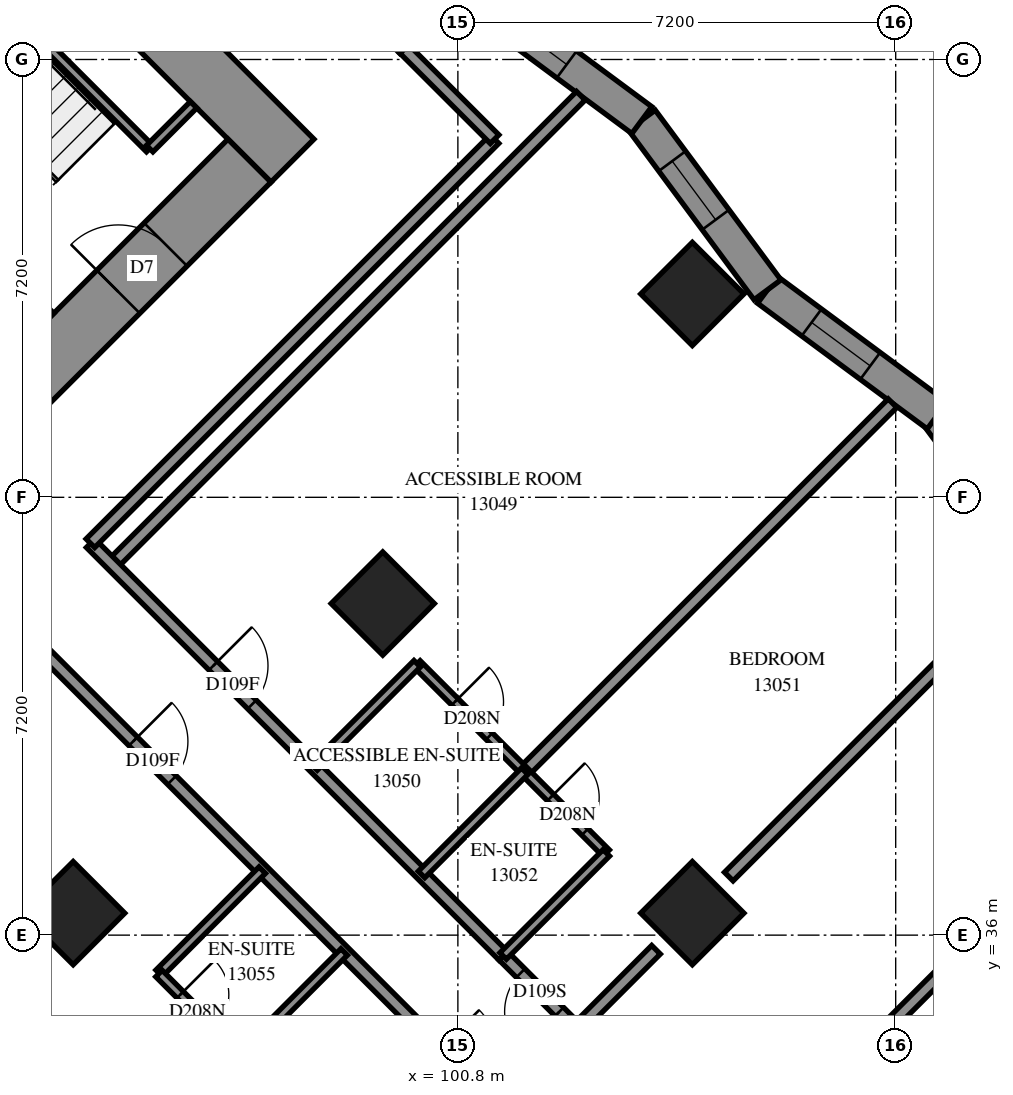
"""IFC4 building model, lengths in metres.
Left out: names, types, materials, properties, quantities, classifications, styles, units other than length and angle.
Written with IfcOpenShell. Run it as: python <this file> out.ifc"""

import sys

from ifc_helpers import new_model, si_unit, direction, frame, frame_2d, origin, origin_2d, place, context, subcontext, project, spatial, polyline, rectangle, outline, extrude, element, fill, save


model = new_model("IFC4")
c1 = context("Model", 3, precision=1e-05, world=origin(), true_north=direction((0.0, 1.0)))
c2 = subcontext(c1, "Body", "Model", "MODEL_VIEW")
j1 = project(units=[si_unit("LENGTHUNIT", "METRE"), si_unit("PLANEANGLEUNIT", "RADIAN")], contexts=[c1])
p1 = place(None, origin())
s1 = spatial("IfcSite", under=j1, at=p1, CompositionType="ELEMENT")
p2 = place(p1, origin())
s2 = spatial("IfcBuilding", under=s1, at=p2, CompositionType="ELEMENT")
p3 = place(p2, frame((0.0, 0.0, 50.8)))
s3 = spatial("IfcBuildingStorey", under=s2, at=p3, CompositionType="ELEMENT", Elevation=50.8)
for number, where, z_axis, x_axis in (
    (1, (104.656, 46.544, 0.0), (0.0, 0.0, 1.0), (0.707, -0.707, 0.0)),
    (2, (99.565, 41.453, 0.0), (0.0, 0.0, 1.0), (0.707, -0.707, 0.0)),
    (3, (94.474, 36.362, 0.0), (0.0, 0.0, 1.0), (0.707, -0.707, 0.0)),
    (4, (104.656, 36.362, 0.0), (0.0, 0.0, 1.0), (0.707, -0.707, 0.0)),
):
    element("IfcColumn", number, at=place(p3, frame(where, z_axis=z_axis, x_axis=x_axis)), inside=s3, PredefinedType="COLUMN", context=c2, shape_type="SweptSolid", body=[
        extrude(rectangle(XDim=1.2, YDim=1.2, at=origin_2d()), origin(), (0.0, 0.0, 1.0), 3.1),
    ])
p4 = place(p3, frame((86.483, 60.333, -0.3), z_axis=(0.0, 0.0, 1.0), x_axis=(0.70710983, -0.7071037324, 0.0)))
e5 = element("IfcWall", 5, at=p4, inside=s3, PredefinedType="SHEAR", context=c2, shape_type="SweptSolid", body=[
    extrude(rectangle(XDim=16.4, YDim=1.0, at=frame_2d((8.2, 0.0))), origin(), (0.0, 0.0, 1.0), 2.7),
])
p5 = place(p4, frame((11.0, 0.0, 0.3)))
e6 = element("IfcOpeningElement", 6, at=p5, cuts=e5, PredefinedType="OPENING", context=c2, shape_type="SweptSolid", body=[
    extrude(rectangle(XDim=0.8, YDim=2.1, at=frame_2d((0.4, 1.05))), frame((0.0, 0.51, 0.0), z_axis=(0.0, -1.0, 0.0), x_axis=(1.0, 0.0, 0.0)), (0.0, 0.0, 1.0), 1.02),
])
p6 = place(p3, frame((87.19, 38.554, -0.3), z_axis=(0.0, 0.0, 1.0), x_axis=(0.707103309, 0.7071102534, 0.0)))
e7 = element("IfcWall", 7, at=p6, inside=s3, PredefinedType="SHEAR", context=c2, shape_type="SweptSolid", body=[
    extrude(rectangle(XDim=14.4, YDim=1.0, at=frame_2d((7.2, 0.0))), origin(), (0.0, 0.0, 1.0), 2.7),
])
p7 = place(p6, frame((4.55, 0.0, 0.3)))
e8 = element("IfcOpeningElement", 8, at=p7, cuts=e7, PredefinedType="OPENING", context=c2, shape_type="SweptSolid", body=[
    extrude(rectangle(XDim=1.1, YDim=2.1, at=frame_2d((0.55, 1.05))), frame((0.0, 0.51, 0.0), z_axis=(0.0, -1.0, 0.0), x_axis=(1.0, 0.0, 0.0)), (0.0, 0.0, 1.0), 1.02),
])
p8 = place(p6, frame((11.35, 0.0, 0.3)))
e9 = element("IfcOpeningElement", 9, at=p8, cuts=e7, PredefinedType="OPENING", context=c2, shape_type="SweptSolid", body=[
    extrude(rectangle(XDim=1.1, YDim=2.1, at=frame_2d((0.55, 1.05))), frame((0.0, 0.51, 0.0), z_axis=(0.0, -1.0, 0.0), x_axis=(1.0, 0.0, 0.0)), (0.0, 0.0, 1.0), 1.02),
])
p9 = place(p3, frame((88.958, 51.211, 0.0), z_axis=(0.0, 0.0, 1.0), x_axis=(0.7070998367, -0.7071137256, 0.0)))
e10 = element("IfcWall", 10, at=p9, inside=s3, PredefinedType="SOLIDWALL", context=c2, shape_type="SweptSolid", body=[
    extrude(rectangle(XDim=7.2, YDim=0.3, at=frame_2d((3.6, 0.0))), origin(), (0.0, 0.0, 1.0), 3.1),
])
p10 = place(p3, frame((110.749, 41.755, 0.0), z_axis=(0.0, 0.0, 1.0), x_axis=(-0.5951283843, 0.8036306404, 0.0)))
e11 = element("IfcWall", 11, at=p10, inside=s3, PredefinedType="SOLIDWALL", context=c2, shape_type="SweptSolid", body=[
    extrude(outline(polyline([(0.041, -0.275), (3.514, -0.275), (3.432, 0.275), (-0.041, 0.275), (0.041, -0.275)])), origin(), (0.0, 0.0, 1.0), 3.1),
])
p11 = place(p10, frame((1.266, 0.0, 0.5)))
e12 = element("IfcOpeningElement", 12, at=p11, cuts=e11, PredefinedType="OPENING", context=c2, shape_type="SweptSolid", body=[
    extrude(rectangle(XDim=1.2, YDim=2.45, at=frame_2d((0.6, 1.225))), frame((0.0, 0.285, 0.0), z_axis=(0.0, -1.0, 0.0), x_axis=(1.0, 0.0, 0.0)), (0.0, 0.0, 1.0), 0.57),
])
p12 = place(p3, frame((108.683, 44.545, 0.0), z_axis=(0.0, 0.0, 1.0), x_axis=(-0.8036342136, 0.5951235593, 0.0)))
e13 = element("IfcWall", 13, at=p12, inside=s3, PredefinedType="SOLIDWALL", context=c2, shape_type="SweptSolid", body=[
    extrude(outline(polyline([(-0.041, -0.275), (3.432, -0.275), (3.514, 0.275), (0.041, 0.275), (-0.041, -0.275)])), origin(), (0.0, 0.0, 1.0), 3.1),
])
p13 = place(p12, frame((1.37, 0.0, 0.5)))
e14 = element("IfcOpeningElement", 14, at=p13, cuts=e13, PredefinedType="OPENING", context=c2, shape_type="SweptSolid", body=[
    extrude(rectangle(XDim=1.2, YDim=2.45, at=frame_2d((0.6, 1.225))), frame((0.0, 0.285, 0.0), z_axis=(0.0, -1.0, 0.0), x_axis=(1.0, 0.0, 0.0)), (0.0, 0.0, 1.0), 0.57),
])
p14 = place(p3, frame((105.892, 46.612, 0.0), z_axis=(0.0, 0.0, 1.0), x_axis=(-0.5951283843, 0.8036306404, 0.0)))
e15 = element("IfcWall", 15, at=p14, inside=s3, PredefinedType="SOLIDWALL", context=c2, shape_type="SweptSolid", body=[
    extrude(outline(polyline([(0.041, -0.275), (3.514, -0.275), (3.432, 0.275), (-0.041, 0.275), (0.041, -0.275)])), origin(), (0.0, 0.0, 1.0), 3.1),
])
p15 = place(p14, frame((1.433, 0.0, 0.5)))
e16 = element("IfcOpeningElement", 16, at=p15, cuts=e15, PredefinedType="OPENING", context=c2, shape_type="SweptSolid", body=[
    extrude(rectangle(XDim=1.2, YDim=2.45, at=frame_2d((0.6, 1.225))), frame((0.0, 0.285, 0.0), z_axis=(0.0, -1.0, 0.0), x_axis=(1.0, 0.0, 0.0)), (0.0, 0.0, 1.0), 0.57),
])
p16 = place(p3, frame((103.825, 49.403, 0.0), z_axis=(0.0, 0.0, 1.0), x_axis=(-0.8036444119, 0.5951097875, 0.0)))
e17 = element("IfcWall", 17, at=p16, inside=s3, PredefinedType="SOLIDWALL", context=c2, shape_type="SweptSolid", body=[
    extrude(outline(polyline([(-0.041, -0.275), (3.432, -0.275), (3.514, 0.275), (0.041, 0.275), (-0.041, -0.275)])), origin(), (0.0, 0.0, 1.0), 3.1),
])
p17 = place(p16, frame((1.537, 0.0, 0.5)))
e18 = element("IfcOpeningElement", 18, at=p17, cuts=e17, PredefinedType="OPENING", context=c2, shape_type="SweptSolid", body=[
    extrude(rectangle(XDim=1.2, YDim=2.45, at=frame_2d((0.6, 1.225))), frame((0.0, 0.285, 0.0), z_axis=(0.0, -1.0, 0.0), x_axis=(1.0, 0.0, 0.0)), (0.0, 0.0, 1.0), 0.57),
])
p18 = place(p3, frame((91.313, 53.354, 0.0), z_axis=(0.0, 0.0, 1.0), x_axis=(0.7071147811, -0.7070987812, 0.0)))
e19 = element("IfcWall", 19, at=p18, inside=s3, PredefinedType="PARTITIONING", context=c2, shape_type="SweptSolid", body=[
    extrude(rectangle(XDim=6.25, YDim=0.15, at=frame_2d((3.125, 0.0))), origin(), (0.0, 0.0, 1.0), 3.1),
])
p19 = place(p3, frame((95.732, 48.934, 0.0), z_axis=(0.0, 0.0, 1.0), x_axis=(0.7071067812, 0.7071067812, 0.0)))
e20 = element("IfcWall", 20, at=p19, inside=s3, PredefinedType="PARTITIONING", context=c2, shape_type="SweptSolid", body=[
    extrude(rectangle(XDim=1.02, YDim=0.15, at=frame_2d((0.51, 0.0))), origin(), (0.0, 0.0, 1.0), 3.1),
])
p20 = place(p3, frame((93.481, 41.167, 0.0), z_axis=(0.0, 0.0, 1.0), x_axis=(0.7071067812, -0.7071067812, 0.0)))
e21 = element("IfcWall", 21, at=p20, inside=s3, PredefinedType="PARTITIONING", context=c2, shape_type="SweptSolid", body=[
    extrude(rectangle(XDim=25.699, YDim=0.2, at=frame_2d((12.85, 0.0))), origin(), (0.0, 0.0, 1.0), 3.1),
])
p21 = place(p20, frame((2.8, 0.0, 0.0)))
e22 = element("IfcOpeningElement", 22, at=p21, cuts=e21, PredefinedType="OPENING", context=c2, shape_type="SweptSolid", body=[
    extrude(rectangle(XDim=0.9, YDim=2.1, at=frame_2d((0.45, 1.05))), frame((0.0, 0.11, 0.0), z_axis=(0.0, -1.0, 0.0), x_axis=(1.0, 0.0, 0.0)), (0.0, 0.0, 1.0), 0.22),
])
p22 = place(p20, frame((9.948, 0.0, 0.0)))
e23 = element("IfcOpeningElement", 23, at=p22, cuts=e21, PredefinedType="OPENING", context=c2, shape_type="SweptSolid", body=[
    extrude(rectangle(XDim=0.9, YDim=2.1, at=frame_2d((0.45, 1.05))), frame((0.0, 0.11, 0.0), z_axis=(0.0, -1.0, 0.0), x_axis=(1.0, 0.0, 0.0)), (0.0, 0.0, 1.0), 0.22),
])
p23 = place(p20, frame((11.7, 0.0, 0.0)))
e24 = element("IfcOpeningElement", 24, at=p23, cuts=e21, PredefinedType="OPENING", context=c2, shape_type="SweptSolid", body=[
    extrude(rectangle(XDim=0.9, YDim=2.1, at=frame_2d((0.45, 1.05))), frame((0.0, 0.11, 0.0), z_axis=(0.0, -1.0, 0.0), x_axis=(1.0, 0.0, 0.0)), (0.0, 0.0, 1.0), 0.22),
])
p24 = place(p20, frame((17.25, 0.0, 0.0)))
e25 = element("IfcOpeningElement", 25, at=p24, cuts=e21, PredefinedType="OPENING", context=c2, shape_type="SweptSolid", body=[
    extrude(rectangle(XDim=0.9, YDim=2.1, at=frame_2d((0.45, 1.05))), frame((0.0, 0.11, 0.0), z_axis=(0.0, -1.0, 0.0), x_axis=(1.0, 0.0, 0.0)), (0.0, 0.0, 1.0), 0.22),
])
p25 = place(p20, frame((22.82, 0.0, 0.0)))
e26 = element("IfcOpeningElement", 26, at=p25, cuts=e21, PredefinedType="OPENING", context=c2, shape_type="SweptSolid", body=[
    extrude(rectangle(XDim=0.9, YDim=2.1, at=frame_2d((0.45, 1.05))), frame((0.0, 0.11, 0.0), z_axis=(0.0, -1.0, 0.0), x_axis=(1.0, 0.0, 0.0)), (0.0, 0.0, 1.0), 0.22),
])
p26 = place(p3, frame((111.352, 25.855, 0.0), z_axis=(0.0, 0.0, 1.0), x_axis=(-0.7070418597, 0.7071716967, 0.0)))
e27 = element("IfcWall", 27, at=p26, inside=s3, PredefinedType="PARTITIONING", context=c2, shape_type="SweptSolid", body=[
    extrude(rectangle(XDim=13.864, YDim=0.2, at=frame_2d((6.932, 0.0))), origin(), (0.0, 0.0, 1.0), 3.1),
])
p27 = place(p26, frame((12.564, 0.0, 0.0)))
e28 = element("IfcOpeningElement", 28, at=p27, cuts=e27, PredefinedType="OPENING", context=c2, shape_type="SweptSolid", body=[
    extrude(rectangle(XDim=0.9, YDim=2.1, at=frame_2d((0.45, 1.05))), frame((0.0, 0.11, 0.0), z_axis=(0.0, -1.0, 0.0), x_axis=(1.0, 0.0, 0.0)), (0.0, 0.0, 1.0), 0.22),
])
p28 = place(p26, frame((5.19, 0.0, 0.0)))
e29 = element("IfcOpeningElement", 29, at=p28, cuts=e27, PredefinedType="OPENING", context=c2, shape_type="SweptSolid", body=[
    extrude(rectangle(XDim=1.0, YDim=2.1, at=frame_2d((0.5, 1.05))), frame((0.0, 0.11, 0.0), z_axis=(0.0, -1.0, 0.0), x_axis=(1.0, 0.0, 0.0)), (0.0, 0.0, 1.0), 0.22),
])
p29 = place(p3, frame((105.292, 31.908, 0.0), z_axis=(0.0, 0.0, 1.0), x_axis=(0.7071022382, 0.7071113241, 0.0)))
e30 = element("IfcWall", 30, at=p29, inside=s3, PredefinedType="PARTITIONING", context=c2, shape_type="SweptSolid", body=[
    extrude(rectangle(XDim=11.006, YDim=0.2, at=frame_2d((5.503, 0.0))), origin(), (0.0, 0.0, 1.0), 3.1),
])
p30 = place(p3, frame((95.109, 42.091, 0.0), z_axis=(0.0, 0.0, 1.0), x_axis=(0.7071113651, 0.7071021972, 0.0)))
e31 = element("IfcWall", 31, at=p30, inside=s3, PredefinedType="PARTITIONING", context=c2, shape_type="SweptSolid", body=[
    extrude(rectangle(XDim=10.908, YDim=0.2, at=frame_2d((5.454, 0.0))), origin(), (0.0, 0.0, 1.0), 3.1),
])
p31 = place(p3, frame((94.761, 42.446, 0.0), z_axis=(0.0, 0.0, 1.0), x_axis=(0.7071067812, -0.7071067812, 0.0)))
e32 = element("IfcWall", 32, at=p31, inside=s3, PredefinedType="PARTITIONING", context=c2, shape_type="SweptSolid", body=[
    extrude(rectangle(XDim=9.597, YDim=0.2, at=frame_2d((4.798, 0.0))), origin(), (0.0, 0.0, 1.0), 3.1),
])
p32 = place(p31, frame((2.851, 0.0, 0.0)))
e33 = element("IfcOpeningElement", 33, at=p32, cuts=e32, PredefinedType="OPENING", context=c2, shape_type="SweptSolid", body=[
    extrude(rectangle(XDim=0.9, YDim=2.1, at=frame_2d((0.45, 1.05))), frame((0.0, 0.11, 0.0), z_axis=(0.0, -1.0, 0.0), x_axis=(1.0, 0.0, 0.0)), (0.0, 0.0, 1.0), 0.22),
])
p33 = place(p3, frame((94.757, 42.445, 0.0), z_axis=(0.0, 0.0, 1.0), x_axis=(0.7071067812, 0.7071067812, 0.0)))
e34 = element("IfcWall", 34, at=p33, inside=s3, PredefinedType="PARTITIONING", context=c2, shape_type="SweptSolid", body=[
    extrude(rectangle(XDim=9.399, YDim=0.2, at=frame_2d((4.699, 0.0))), origin(), (0.0, 0.0, 1.0), 3.1),
])
p34 = place(p3, frame((101.896, 38.698, 0.0), z_axis=(0.0, 0.0, 1.0), x_axis=(0.7072294804, 0.7069840607, 0.0)))
e35 = element("IfcWall", 35, at=p34, inside=s3, PredefinedType="PARTITIONING", context=c2, shape_type="SweptSolid", body=[
    extrude(rectangle(XDim=8.557, YDim=0.2, at=frame_2d((4.278, 0.0))), origin(), (0.0, 0.0, 1.0), 3.1),
])
p35 = place(p3, frame((105.255, 36.963, 0.0), z_axis=(0.0, 0.0, 1.0), x_axis=(0.7071067812, 0.7071067812, 0.0)))
e36 = element("IfcWall", 36, at=p35, inside=s3, PredefinedType="PARTITIONING", context=c2, shape_type="SweptSolid", body=[
    extrude(rectangle(XDim=5.504, YDim=0.2, at=frame_2d((2.752, 0.0))), origin(), (0.0, 0.0, 1.0), 3.1),
])
p36 = place(p3, frame((100.126, 40.461, 0.0), z_axis=(0.0, 0.0, 1.0), x_axis=(0.7071067812, -0.7071067812, 0.0)))
e37 = element("IfcWall", 37, at=p36, inside=s3, PredefinedType="PARTITIONING", context=c2, shape_type="SweptSolid", body=[
    extrude(rectangle(XDim=4.401, YDim=0.15, at=frame_2d((2.2, 0.0))), origin(), (0.0, 0.0, 1.0), 3.1),
])
p37 = place(p36, frame((0.883, 0.0, 0.0)))
e38 = element("IfcOpeningElement", 38, at=p37, cuts=e37, PredefinedType="OPENING", context=c2, shape_type="SweptSolid", body=[
    extrude(rectangle(XDim=0.8, YDim=2.1, at=frame_2d((0.4, 1.05))), frame((0.0, 0.085, 0.0), z_axis=(0.0, -1.0, 0.0), x_axis=(1.0, 0.0, 0.0)), (0.0, 0.0, 1.0), 0.17),
])
p38 = place(p36, frame((3.108, 0.0, 0.0)))
e39 = element("IfcOpeningElement", 39, at=p38, cuts=e37, PredefinedType="OPENING", context=c2, shape_type="SweptSolid", body=[
    extrude(rectangle(XDim=0.8, YDim=2.1, at=frame_2d((0.4, 1.05))), frame((0.0, 0.085, 0.0), z_axis=(0.0, -1.0, 0.0), x_axis=(1.0, 0.0, 0.0)), (0.0, 0.0, 1.0), 0.17),
])
for number, where, z_axis, x_axis in (
    (40, (97.234, 34.026, 0.0), (0.0, 0.0, 1.0), (0.707, 0.708, 0.0)),
    (41, (98.435, 38.765, 0.0), (0.0, 0.0, 1.0), (0.707, 0.708, 0.0)),
    (42, (100.203, 36.997, 0.0), (0.0, 0.0, 1.0), (0.707, 0.708, 0.0)),
):
    element("IfcWall", number, at=place(p3, frame(where, z_axis=z_axis, x_axis=x_axis)), inside=s3, PredefinedType="PARTITIONING", context=c2, shape_type="SweptSolid", body=[
        extrude(rectangle(XDim=2.4, YDim=0.15, at=frame_2d((1.2, 0.0))), origin(), (0.0, 0.0, 1.0), 3.1),
    ])
for number, where, z_axis, x_axis in (
    (43, (95.887, 35.373, 0.0), (0.0, 0.0, 1.0), (0.707, 0.707, 0.0)),
    (44, (101.545, 35.657, 0.0), (0.0, 0.0, 1.0), (0.707, 0.707, 0.0)),
):
    element("IfcWall", number, at=place(p3, frame(where, z_axis=z_axis, x_axis=x_axis)), inside=s3, PredefinedType="PARTITIONING", context=c2, shape_type="SweptSolid", body=[
        extrude(rectangle(XDim=2.398, YDim=0.15, at=frame_2d((1.199, 0.0))), origin(), (0.0, 0.0, 1.0), 3.1),
    ])
p39 = place(p3, frame((99.918, 50.574, 0.0), z_axis=(0.0, 0.0, 1.0), x_axis=(0.7075827869, -0.7066304548, 0.0)))
e45 = element("IfcWall", 45, at=p39, inside=s3, PredefinedType="PARTITIONING", context=c2, shape_type="SweptSolid", body=[
    extrude(rectangle(XDim=2.1, YDim=0.2, at=frame_2d((1.05, 0.0))), origin(), (0.0, 0.0, 1.0), 3.1),
])
p40 = place(p3, frame((95.885, 35.369, 0.0), z_axis=(0.0, 0.0, 1.0), x_axis=(0.7071067812, -0.7071067812, 0.0)))
e46 = element("IfcWall", 46, at=p40, inside=s3, PredefinedType="PARTITIONING", context=c2, shape_type="SweptSolid", body=[
    extrude(rectangle(XDim=1.901, YDim=0.15, at=frame_2d((0.95, 0.0))), origin(), (0.0, 0.0, 1.0), 3.1),
])
p41 = place(p40, frame((0.493, 0.0, 0.0)))
e47 = element("IfcOpeningElement", 47, at=p41, cuts=e46, PredefinedType="OPENING", context=c2, shape_type="SweptSolid", body=[
    extrude(rectangle(XDim=0.8, YDim=2.1, at=frame_2d((0.4, 1.05))), frame((0.0, 0.085, 0.0), z_axis=(0.0, -1.0, 0.0), x_axis=(1.0, 0.0, 0.0)), (0.0, 0.0, 1.0), 0.17),
])
p42 = place(p3, frame((102.75, 34.45, 0.0), z_axis=(0.0, 0.0, 1.0), x_axis=(0.7065663865, 0.7076467632, 0.0)))
e48 = element("IfcWall", 48, at=p42, inside=s3, PredefinedType="PARTITIONING", context=c2, shape_type="SweptSolid", body=[
    extrude(rectangle(XDim=1.851, YDim=0.2, at=frame_2d((0.926, 0.0))), origin(), (0.0, 0.0, 1.0), 3.1),
])
p43 = place(p3, frame((99.453, 51.033, 0.0), z_axis=(0.0, 0.0, 1.0), x_axis=(0.7071067812, -0.7071067812, 0.0)))
e49 = element("IfcWall", 49, at=p43, inside=s3, PredefinedType="PARTITIONING", context=c2, shape_type="SweptSolid", body=[
    extrude(rectangle(XDim=0.653, YDim=0.2, at=frame_2d((0.327, 0.0))), origin(), (0.0, 0.0, 1.0), 3.1),
])
p44 = place(p13, origin())
e50 = element("IfcWindow", 50, at=p44, inside=s3, PartitioningType="SINGLE_PANEL", PredefinedType="WINDOW", context=c2, shape_type="SweptSolid", body=[
    extrude(rectangle(XDim=1.2, YDim=2.45, at=frame_2d((0.6, 1.225))), frame((0.0, 0.155, 0.0), z_axis=(0.0, -1.0, 0.0), x_axis=(1.0, 0.0, 0.0)), (0.0, 0.0, 1.0), 0.06),
])
fill(e14, e50)
p45 = place(p15, origin())
e51 = element("IfcWindow", 51, at=p45, inside=s3, PartitioningType="SINGLE_PANEL", PredefinedType="WINDOW", context=c2, shape_type="SweptSolid", body=[
    extrude(rectangle(XDim=1.2, YDim=2.45, at=frame_2d((0.6, 1.225))), frame((0.0, 0.155, 0.0), z_axis=(0.0, -1.0, 0.0), x_axis=(1.0, 0.0, 0.0)), (0.0, 0.0, 1.0), 0.06),
])
fill(e16, e51)
p46 = place(p17, origin())
e52 = element("IfcWindow", 52, at=p46, inside=s3, PartitioningType="SINGLE_PANEL", PredefinedType="WINDOW", context=c2, shape_type="SweptSolid", body=[
    extrude(rectangle(XDim=1.2, YDim=2.45, at=frame_2d((0.6, 1.225))), frame((0.0, 0.155, 0.0), z_axis=(0.0, -1.0, 0.0), x_axis=(1.0, 0.0, 0.0)), (0.0, 0.0, 1.0), 0.06),
])
fill(e18, e52)
p47 = place(p8, origin())
e53 = element("IfcDoor", 53, at=p47, inside=s3, OperationType="SINGLE_SWING_RIGHT", PredefinedType="DOOR", context=c2, shape_type="SweptSolid", body=[
    extrude(rectangle(XDim=1.1, YDim=2.1, at=frame_2d((0.55, 1.05))), frame((0.0, 0.025, 0.0), z_axis=(0.0, -1.0, 0.0), x_axis=(1.0, 0.0, 0.0)), (0.0, 0.0, 1.0), 0.05),
])
fill(e9, e53)
p48 = place(p32, origin())
e54 = element("IfcDoor", 54, at=p48, inside=s3, OperationType="SINGLE_SWING_RIGHT", PredefinedType="DOOR", context=c2, shape_type="SweptSolid", body=[
    extrude(rectangle(XDim=0.9, YDim=2.1, at=frame_2d((0.45, 1.05))), frame((0.0, 0.025, 0.0), z_axis=(0.0, -1.0, 0.0), x_axis=(1.0, 0.0, 0.0)), (0.0, 0.0, 1.0), 0.05),
])
fill(e33, e54)
p49 = place(p37, origin())
e55 = element("IfcDoor", 55, at=p49, inside=s3, OperationType="SINGLE_SWING_RIGHT", PredefinedType="DOOR", context=c2, shape_type="SweptSolid", body=[
    extrude(rectangle(XDim=0.8, YDim=2.1, at=frame_2d((0.4, 1.05))), frame((0.0, 0.025, 0.0), z_axis=(0.0, -1.0, 0.0), x_axis=(1.0, 0.0, 0.0)), (0.0, 0.0, 1.0), 0.05),
])
fill(e38, e55)
p50 = place(p27, origin())
e56 = element("IfcDoor", 56, at=p50, inside=s3, OperationType="SINGLE_SWING_RIGHT", PredefinedType="DOOR", context=c2, shape_type="SweptSolid", body=[
    extrude(rectangle(XDim=0.9, YDim=2.1, at=frame_2d((0.45, 1.05))), frame((0.0, 0.025, 0.0), z_axis=(0.0, -1.0, 0.0), x_axis=(1.0, 0.0, 0.0)), (0.0, 0.0, 1.0), 0.05),
])
fill(e28, e56)
p51 = place(p38, origin())
e57 = element("IfcDoor", 57, at=p51, inside=s3, OperationType="SINGLE_SWING_RIGHT", PredefinedType="DOOR", context=c2, shape_type="SweptSolid", body=[
    extrude(rectangle(XDim=0.8, YDim=2.1, at=frame_2d((0.4, 1.05))), frame((0.0, 0.025, 0.0), z_axis=(0.0, -1.0, 0.0), x_axis=(1.0, 0.0, 0.0)), (0.0, 0.0, 1.0), 0.05),
])
fill(e39, e57)
p52 = place(p21, origin())
e58 = element("IfcDoor", 58, at=p52, inside=s3, OperationType="SINGLE_SWING_LEFT", PredefinedType="DOOR", context=c2, shape_type="SweptSolid", body=[
    extrude(rectangle(XDim=0.9, YDim=2.1, at=frame_2d((0.45, 1.05))), frame((0.0, 0.025, 0.0), z_axis=(0.0, -1.0, 0.0), x_axis=(1.0, 0.0, 0.0)), (0.0, 0.0, 1.0), 0.05),
])
fill(e22, e58)
p53 = place(p41, origin())
e59 = element("IfcDoor", 59, at=p53, inside=s3, OperationType="SINGLE_SWING_RIGHT", PredefinedType="DOOR", context=c2, shape_type="SweptSolid", body=[
    extrude(rectangle(XDim=0.8, YDim=2.1, at=frame_2d((0.4, 1.05))), frame((0.0, 0.025, 0.0), z_axis=(0.0, -1.0, 0.0), x_axis=(1.0, 0.0, 0.0)), (0.0, 0.0, 1.0), 0.05),
])
fill(e47, e59)
save(model, sys.argv[1])
